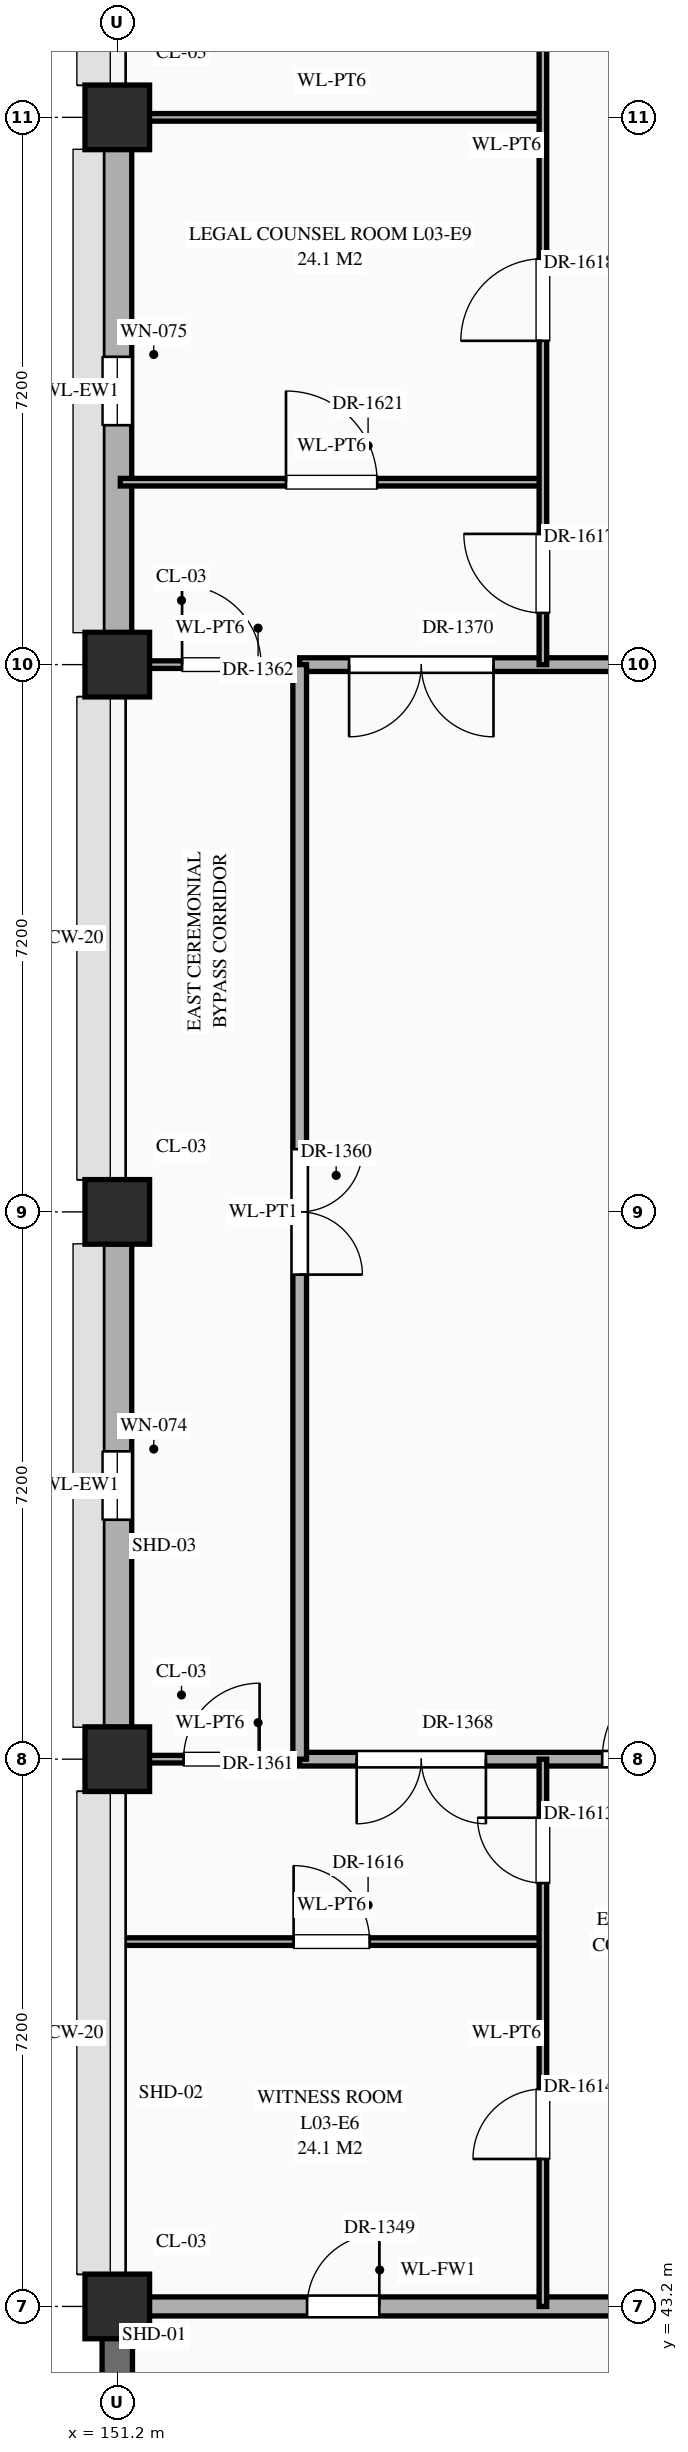
"""IFC4 building model, lengths in metres.
Left out: names, types, materials, properties, quantities, classifications, styles, units other than length and angle.
Written with IfcOpenShell. Run it as: python <this file> out.ifc"""

import sys

from ifc_helpers import new_model, si_unit, direction, frame, frame_2d, origin, origin_2d, place, context, subcontext, project, spatial, rectangle, extrude, element, fill, save


model = new_model("IFC4")
c1 = context("Model", 3, precision=1e-05, world=origin(), true_north=direction((0.0, 1.0)))
c2 = subcontext(c1, "Body", "Model", "MODEL_VIEW")
j1 = project(units=[si_unit("LENGTHUNIT", "METRE"), si_unit("PLANEANGLEUNIT", "RADIAN")], contexts=[c1])
p1 = place(None, origin())
s1 = spatial("IfcSite", under=j1, at=p1, CompositionType="ELEMENT")
p2 = place(p1, origin())
s2 = spatial("IfcBuilding", under=s1, at=p2, CompositionType="ELEMENT")
p3 = place(p2, frame((0.0, 0.0, 10.8)))
s3 = spatial("IfcBuildingStorey", under=s2, at=p3, CompositionType="ELEMENT", Elevation=10.8)
for number, where, z_axis, x_axis in (
    (1, (151.2, 43.2, 0.0), (0.0, 0.0, 1.0), (1.0, 0.0, 0.0)),
    (2, (151.2, 50.4, 0.0), (0.0, 0.0, 1.0), (1.0, 0.0, 0.0)),
    (3, (151.2, 57.6, 0.0), (0.0, 0.0, 1.0), (1.0, 0.0, 0.0)),
    (4, (151.2, 64.8, 0.0), (0.0, 0.0, 1.0), (1.0, 0.0, 0.0)),
    (5, (151.2, 72.0, 0.0), (0.0, 0.0, 1.0), (1.0, 0.0, 0.0)),
):
    element("IfcColumn", number, at=place(p3, frame(where, z_axis=z_axis, x_axis=x_axis)), inside=s3, PredefinedType="COLUMN", context=c2, shape_type="SweptSolid", body=[
        extrude(rectangle(XDim=0.85, YDim=0.85, at=origin_2d()), origin(), (0.0, 0.0, 1.0), 5.4),
    ])
p4 = place(p3, frame((151.2, 36.42, 0.0), z_axis=(0.0, 0.0, 1.0), x_axis=(0.0, 1.0, 0.0)))
e6 = element("IfcWall", 6, at=p4, inside=s3, PredefinedType="SHEAR", context=c2, shape_type="SweptSolid", body=[
    extrude(rectangle(XDim=6.36, YDim=0.4, at=frame_2d((3.18, 0.0))), origin(), (0.0, 0.0, 1.0), 5.12),
])
p5 = place(p3, frame((151.2, 50.82, 0.0), z_axis=(0.0, 0.0, 1.0), x_axis=(0.0, 1.0, 0.0)))
e7 = element("IfcWall", 7, at=p5, inside=s3, PredefinedType="STANDARD", context=c2, shape_type="SweptSolid", body=[
    extrude(rectangle(XDim=6.36, YDim=0.38, at=frame_2d((3.18, 0.0))), origin(), (0.0, 0.0, 1.0), 4.47),
])
p6 = place(p5, frame((2.73, 0.0, 0.85)))
e8 = element("IfcOpeningElement", 8, at=p6, cuts=e7, PredefinedType="OPENING", context=c2, shape_type="SweptSolid", body=[
    extrude(rectangle(XDim=0.9, YDim=1.56, at=frame_2d((0.45, 0.78))), frame((0.0, 0.202, 0.0), z_axis=(0.0, -1.0, 0.0), x_axis=(1.0, 0.0, 0.0)), (0.0, 0.0, 1.0), 0.404),
])
p7 = place(p3, frame((151.2, 65.22, 0.0), z_axis=(0.0, 0.0, 1.0), x_axis=(0.0, 1.0, 0.0)))
e9 = element("IfcWall", 9, at=p7, inside=s3, PredefinedType="STANDARD", context=c2, shape_type="SweptSolid", body=[
    extrude(rectangle(XDim=6.36, YDim=0.38, at=frame_2d((3.18, 0.0))), origin(), (0.0, 0.0, 1.0), 4.47),
])
p8 = place(p7, frame((2.73, 0.0, 0.85)))
e10 = element("IfcOpeningElement", 10, at=p8, cuts=e9, PredefinedType="OPENING", context=c2, shape_type="SweptSolid", body=[
    extrude(rectangle(XDim=0.9, YDim=1.92, at=frame_2d((0.45, 0.96))), frame((0.0, 0.202, 0.0), z_axis=(0.0, -1.0, 0.0), x_axis=(1.0, 0.0, 0.0)), (0.0, 0.0, 1.0), 0.404),
])
p9 = place(p3, frame((151.24, 43.2, 0.0), z_axis=(0.0, 0.0, 1.0), x_axis=(1.0, 0.0, 0.0)))
e11 = element("IfcWall", 11, at=p9, inside=s3, PredefinedType="STANDARD", context=c2, shape_type="SweptSolid", body=[
    extrude(rectangle(XDim=8.36, YDim=0.25, at=frame_2d((4.18, 0.0))), origin(), (0.0, 0.0, 1.0), 4.07),
])
p10 = place(p9, frame((6.46, 0.0, 0.0)))
e12 = element("IfcOpeningElement", 12, at=p10, cuts=e11, PredefinedType="OPENING", context=c2, shape_type="SweptSolid", body=[
    extrude(rectangle(XDim=1.0, YDim=2.2, at=frame_2d((0.5, 1.1))), frame((0.0, 0.137, 0.0), z_axis=(0.0, -1.0, 0.0), x_axis=(1.0, 0.0, 0.0)), (0.0, 0.0, 1.0), 0.274),
])
p11 = place(p9, frame((2.458, 0.0, 0.0)))
e13 = element("IfcOpeningElement", 13, at=p11, cuts=e11, PredefinedType="OPENING", context=c2, shape_type="SweptSolid", body=[
    extrude(rectangle(XDim=0.95, YDim=2.15, at=frame_2d((0.475, 1.075))), frame((0.0, 0.137, 0.0), z_axis=(0.0, -1.0, 0.0), x_axis=(1.0, 0.0, 0.0)), (0.0, 0.0, 1.0), 0.274),
])
p12 = place(p3, frame((151.24, 48.0, 0.0), z_axis=(0.0, 0.0, 1.0), x_axis=(1.0, 0.0, 0.0)))
e14 = element("IfcWall", 14, at=p12, inside=s3, PredefinedType="STANDARD", context=c2, shape_type="SweptSolid", body=[
    extrude(rectangle(XDim=5.56, YDim=0.1, at=frame_2d((2.78, 0.0))), origin(), (0.0, 0.0, 1.0), 5.12),
])
p13 = place(p12, frame((2.28, 0.0, 0.0)))
e15 = element("IfcOpeningElement", 15, at=p13, cuts=e14, PredefinedType="OPENING", context=c2, shape_type="SweptSolid", body=[
    extrude(rectangle(XDim=1.0, YDim=2.25, at=frame_2d((0.5, 1.125))), frame((0.0, 0.062, 0.0), z_axis=(0.0, -1.0, 0.0), x_axis=(1.0, 0.0, 0.0)), (0.0, 0.0, 1.0), 0.124),
])
p14 = place(p3, frame((151.24, 50.4, 0.0), z_axis=(0.0, 0.0, 1.0), x_axis=(1.0, 0.0, 0.0)))
e16 = element("IfcWall", 16, at=p14, inside=s3, PredefinedType="STANDARD", context=c2, shape_type="SweptSolid", body=[
    extrude(rectangle(XDim=2.36, YDim=0.1, at=frame_2d((1.18, 0.0))), origin(), (0.0, 0.0, 1.0), 4.07),
])
p15 = place(p14, frame((0.833, 0.0, 0.0)))
e17 = element("IfcOpeningElement", 17, at=p15, cuts=e16, PredefinedType="OPENING", context=c2, shape_type="SweptSolid", body=[
    extrude(rectangle(XDim=1.0, YDim=2.25, at=frame_2d((0.5, 1.125))), frame((0.0, 0.062, 0.0), z_axis=(0.0, -1.0, 0.0), x_axis=(1.0, 0.0, 0.0)), (0.0, 0.0, 1.0), 0.124),
])
p16 = place(p3, frame((153.6, 50.4, 0.0), z_axis=(0.0, 0.0, 1.0), x_axis=(1.0, 0.0, 0.0)))
e18 = element("IfcWall", 18, at=p16, inside=s3, PredefinedType="STANDARD", context=c2, shape_type="SweptSolid", body=[
    extrude(rectangle(XDim=14.36, YDim=0.18, at=frame_2d((7.18, 0.0))), origin(), (0.0, 0.0, 1.0), 4.07),
])
p17 = place(p16, frame((3.98, 0.0, 0.0)))
e19 = element("IfcOpeningElement", 19, at=p17, cuts=e18, PredefinedType="OPENING", context=c2, shape_type="SweptSolid", body=[
    extrude(rectangle(XDim=1.24, YDim=2.3, at=frame_2d((0.62, 1.15))), frame((0.0, 0.102, 0.0), z_axis=(0.0, -1.0, 0.0), x_axis=(1.0, 0.0, 0.0)), (0.0, 0.0, 1.0), 0.204),
])
p18 = place(p16, frame((0.75, 0.0, 0.0)))
e20 = element("IfcOpeningElement", 20, at=p18, cuts=e18, PredefinedType="OPENING", context=c2, shape_type="SweptSolid", body=[
    extrude(rectangle(XDim=1.7, YDim=2.45, at=frame_2d((0.85, 1.225))), frame((0.0, 0.102, 0.0), z_axis=(0.0, -1.0, 0.0), x_axis=(1.0, 0.0, 0.0)), (0.0, 0.0, 1.0), 0.204),
])
p19 = place(p3, frame((151.24, 64.8, 0.0), z_axis=(0.0, 0.0, 1.0), x_axis=(1.0, 0.0, 0.0)))
e21 = element("IfcWall", 21, at=p19, inside=s3, PredefinedType="STANDARD", context=c2, shape_type="SweptSolid", body=[
    extrude(rectangle(XDim=2.36, YDim=0.1, at=frame_2d((1.18, 0.0))), origin(), (0.0, 0.0, 1.0), 4.07),
])
p20 = place(p19, frame((0.812, 0.0, 0.0)))
e22 = element("IfcOpeningElement", 22, at=p20, cuts=e21, PredefinedType="OPENING", context=c2, shape_type="SweptSolid", body=[
    extrude(rectangle(XDim=1.04, YDim=2.2, at=frame_2d((0.52, 1.1))), frame((0.0, 0.062, 0.0), z_axis=(0.0, -1.0, 0.0), x_axis=(1.0, 0.0, 0.0)), (0.0, 0.0, 1.0), 0.124),
])
p21 = place(p3, frame((153.6, 64.8, 0.0), z_axis=(0.0, 0.0, 1.0), x_axis=(1.0, 0.0, 0.0)))
e23 = element("IfcWall", 23, at=p21, inside=s3, PredefinedType="STANDARD", context=c2, shape_type="SweptSolid", body=[
    extrude(rectangle(XDim=14.36, YDim=0.18, at=frame_2d((7.18, 0.0))), origin(), (0.0, 0.0, 1.0), 4.07),
])
p22 = place(p21, frame((4.13, 0.0, 0.0)))
e24 = element("IfcOpeningElement", 24, at=p22, cuts=e23, PredefinedType="OPENING", context=c2, shape_type="SweptSolid", body=[
    extrude(rectangle(XDim=0.94, YDim=2.3, at=frame_2d((0.47, 1.15))), frame((0.0, 0.102, 0.0), z_axis=(0.0, -1.0, 0.0), x_axis=(1.0, 0.0, 0.0)), (0.0, 0.0, 1.0), 0.204),
])
p23 = place(p21, frame((0.65, 0.0, 0.0)))
e25 = element("IfcOpeningElement", 25, at=p23, cuts=e23, PredefinedType="OPENING", context=c2, shape_type="SweptSolid", body=[
    extrude(rectangle(XDim=1.9, YDim=2.5, at=frame_2d((0.95, 1.25))), frame((0.0, 0.102, 0.0), z_axis=(0.0, -1.0, 0.0), x_axis=(1.0, 0.0, 0.0)), (0.0, 0.0, 1.0), 0.204),
])
p24 = place(p3, frame((151.24, 67.2, 0.0), z_axis=(0.0, 0.0, 1.0), x_axis=(1.0, 0.0, 0.0)))
e26 = element("IfcWall", 26, at=p24, inside=s3, PredefinedType="STANDARD", context=c2, shape_type="SweptSolid", body=[
    extrude(rectangle(XDim=5.56, YDim=0.1, at=frame_2d((2.78, 0.0))), origin(), (0.0, 0.0, 1.0), 5.12),
])
p25 = place(p24, frame((2.18, 0.0, 0.0)))
e27 = element("IfcOpeningElement", 27, at=p25, cuts=e26, PredefinedType="OPENING", context=c2, shape_type="SweptSolid", body=[
    extrude(rectangle(XDim=1.2, YDim=2.35, at=frame_2d((0.6, 1.175))), frame((0.0, 0.062, 0.0), z_axis=(0.0, -1.0, 0.0), x_axis=(1.0, 0.0, 0.0)), (0.0, 0.0, 1.0), 0.124),
])
p26 = place(p3, frame((151.24, 72.0, 0.0), z_axis=(0.0, 0.0, 1.0), x_axis=(1.0, 0.0, 0.0)))
e28 = element("IfcWall", 28, at=p26, inside=s3, PredefinedType="STANDARD", context=c2, shape_type="SweptSolid", body=[
    extrude(rectangle(XDim=5.56, YDim=0.1, at=frame_2d((2.78, 0.0))), origin(), (0.0, 0.0, 1.0), 4.07),
])
p27 = place(p3, frame((153.6, 50.4, 0.0), z_axis=(0.0, 0.0, 1.0), x_axis=(0.0, 1.0, 0.0)))
e29 = element("IfcWall", 29, at=p27, inside=s3, PredefinedType="STANDARD", context=c2, shape_type="SweptSolid", body=[
    extrude(rectangle(XDim=14.4, YDim=0.18, at=frame_2d((7.2, 0.0))), origin(), (0.0, 0.0, 1.0), 5.12),
])
p28 = place(p27, frame((6.375, 0.0, 0.0)))
e30 = element("IfcOpeningElement", 30, at=p28, cuts=e29, PredefinedType="OPENING", context=c2, shape_type="SweptSolid", body=[
    extrude(rectangle(XDim=1.65, YDim=2.4, at=frame_2d((0.825, 1.2))), frame((0.0, 0.102, 0.0), z_axis=(0.0, -1.0, 0.0), x_axis=(1.0, 0.0, 0.0)), (0.0, 0.0, 1.0), 0.204),
])
p29 = place(p3, frame((156.8, 43.2, 0.0), z_axis=(0.0, 0.0, 1.0), x_axis=(0.0, 1.0, 0.0)))
e31 = element("IfcWall", 31, at=p29, inside=s3, PredefinedType="STANDARD", context=c2, shape_type="SweptSolid", body=[
    extrude(rectangle(XDim=7.2, YDim=0.1, at=frame_2d((3.6, 0.0))), origin(), (0.0, 0.0, 1.0), 5.12),
])
p30 = place(p29, frame((5.57, 0.0, 0.0)))
e32 = element("IfcOpeningElement", 32, at=p30, cuts=e31, PredefinedType="OPENING", context=c2, shape_type="SweptSolid", body=[
    extrude(rectangle(XDim=0.86, YDim=2.1, at=frame_2d((0.43, 1.05))), frame((0.0, 0.062, 0.0), z_axis=(0.0, -1.0, 0.0), x_axis=(1.0, 0.0, 0.0)), (0.0, 0.0, 1.0), 0.124),
])
p31 = place(p29, frame((1.94, 0.0, 0.0)))
e33 = element("IfcOpeningElement", 33, at=p31, cuts=e31, PredefinedType="OPENING", context=c2, shape_type="SweptSolid", body=[
    extrude(rectangle(XDim=0.92, YDim=2.15, at=frame_2d((0.46, 1.075))), frame((0.0, 0.062, 0.0), z_axis=(0.0, -1.0, 0.0), x_axis=(1.0, 0.0, 0.0)), (0.0, 0.0, 1.0), 0.124),
])
p32 = place(p3, frame((156.8, 64.8, 0.0), z_axis=(0.0, 0.0, 1.0), x_axis=(0.0, 1.0, 0.0)))
e34 = element("IfcWall", 34, at=p32, inside=s3, PredefinedType="STANDARD", context=c2, shape_type="SweptSolid", body=[
    extrude(rectangle(XDim=19.2, YDim=0.1, at=frame_2d((9.6, 0.0))), origin(), (0.0, 0.0, 1.0), 5.12),
])
p33 = place(p32, frame((16.28, 0.0, 0.0)))
e35 = element("IfcOpeningElement", 35, at=p33, cuts=e34, PredefinedType="OPENING", context=c2, shape_type="SweptSolid", body=[
    extrude(rectangle(XDim=1.04, YDim=2.2, at=frame_2d((0.52, 1.1))), frame((0.0, 0.062, 0.0), z_axis=(0.0, -1.0, 0.0), x_axis=(1.0, 0.0, 0.0)), (0.0, 0.0, 1.0), 0.124),
])
p34 = place(p32, frame((0.68, 0.0, 0.0)))
e36 = element("IfcOpeningElement", 36, at=p34, cuts=e34, PredefinedType="OPENING", context=c2, shape_type="SweptSolid", body=[
    extrude(rectangle(XDim=1.04, YDim=2.2, at=frame_2d((0.52, 1.1))), frame((0.0, 0.062, 0.0), z_axis=(0.0, -1.0, 0.0), x_axis=(1.0, 0.0, 0.0)), (0.0, 0.0, 1.0), 0.124),
])
p35 = place(p32, frame((4.26, 0.0, 0.0)))
e37 = element("IfcOpeningElement", 37, at=p35, cuts=e34, PredefinedType="OPENING", context=c2, shape_type="SweptSolid", body=[
    extrude(rectangle(XDim=1.08, YDim=2.25, at=frame_2d((0.54, 1.125))), frame((0.0, 0.062, 0.0), z_axis=(0.0, -1.0, 0.0), x_axis=(1.0, 0.0, 0.0)), (0.0, 0.0, 1.0), 0.124),
])
p36 = place(p32, frame((10.24, 0.0, 0.0)))
e38 = element("IfcOpeningElement", 38, at=p36, cuts=e34, PredefinedType="OPENING", context=c2, shape_type="SweptSolid", body=[
    extrude(rectangle(XDim=1.12, YDim=2.25, at=frame_2d((0.56, 1.125))), frame((0.0, 0.062, 0.0), z_axis=(0.0, -1.0, 0.0), x_axis=(1.0, 0.0, 0.0)), (0.0, 0.0, 1.0), 0.124),
])
p37 = place(p6, origin())
e39 = element("IfcWindow", 39, at=p37, inside=s3, PartitioningType="SINGLE_PANEL", PredefinedType="WINDOW", context=c2, shape_type="SweptSolid", body=[
    extrude(rectangle(XDim=0.9, YDim=1.56, at=frame_2d((0.45, 0.78))), frame((0.0, 0.03, 0.0), z_axis=(0.0, -1.0, 0.0), x_axis=(1.0, 0.0, 0.0)), (0.0, 0.0, 1.0), 0.06),
])
fill(e8, e39)
p38 = place(p8, origin())
e40 = element("IfcWindow", 40, at=p38, inside=s3, PartitioningType="SINGLE_PANEL", PredefinedType="WINDOW", context=c2, shape_type="SweptSolid", body=[
    extrude(rectangle(XDim=0.9, YDim=1.92, at=frame_2d((0.45, 0.96))), frame((0.0, 0.03, 0.0), z_axis=(0.0, -1.0, 0.0), x_axis=(1.0, 0.0, 0.0)), (0.0, 0.0, 1.0), 0.06),
])
fill(e10, e40)
p39 = place(p11, origin())
e41 = element("IfcDoor", 41, at=p39, inside=s3, OperationType="SINGLE_SWING_RIGHT", PredefinedType="DOOR", context=c2, shape_type="SweptSolid", body=[
    extrude(rectangle(XDim=0.95, YDim=2.15, at=frame_2d((0.475, 1.075))), frame((0.0, 0.025, 0.0), z_axis=(0.0, -1.0, 0.0), x_axis=(1.0, 0.0, 0.0)), (0.0, 0.0, 1.0), 0.05),
])
fill(e13, e41)
p40 = place(p28, frame((1.65, 0.0, 0.0), z_axis=(0.0, 0.0, 1.0), x_axis=(-1.0, 0.0, 0.0)))
e42 = element("IfcDoor", 42, at=p40, inside=s3, OperationType="DOUBLE_DOOR_SINGLE_SWING", PredefinedType="DOOR", context=c2, shape_type="SweptSolid", body=[
    extrude(rectangle(XDim=1.65, YDim=2.4, at=frame_2d((0.825, 1.2))), frame((0.0, 0.025, 0.0), z_axis=(0.0, -1.0, 0.0), x_axis=(1.0, 0.0, 0.0)), (0.0, 0.0, 1.0), 0.05),
])
fill(e30, e42)
p41 = place(p15, origin())
e43 = element("IfcDoor", 43, at=p41, inside=s3, OperationType="SINGLE_SWING_RIGHT", PredefinedType="DOOR", context=c2, shape_type="SweptSolid", body=[
    extrude(rectangle(XDim=1.0, YDim=2.25, at=frame_2d((0.5, 1.125))), frame((0.0, 0.025, 0.0), z_axis=(0.0, -1.0, 0.0), x_axis=(1.0, 0.0, 0.0)), (0.0, 0.0, 1.0), 0.05),
])
fill(e17, e43)
p42 = place(p20, origin())
e44 = element("IfcDoor", 44, at=p42, inside=s3, OperationType="SINGLE_SWING_LEFT", PredefinedType="DOOR", context=c2, shape_type="SweptSolid", body=[
    extrude(rectangle(XDim=1.04, YDim=2.2, at=frame_2d((0.52, 1.1))), frame((0.0, 0.025, 0.0), z_axis=(0.0, -1.0, 0.0), x_axis=(1.0, 0.0, 0.0)), (0.0, 0.0, 1.0), 0.05),
])
fill(e22, e44)
p43 = place(p17, origin())
e45 = element("IfcDoor", 45, at=p43, inside=s3, OperationType="SINGLE_SWING_RIGHT", PredefinedType="DOOR", context=c2, shape_type="SweptSolid", body=[
    extrude(rectangle(XDim=1.24, YDim=2.3, at=frame_2d((0.62, 1.15))), frame((0.0, 0.025, 0.0), z_axis=(0.0, -1.0, 0.0), x_axis=(1.0, 0.0, 0.0)), (0.0, 0.0, 1.0), 0.05),
])
fill(e19, e45)
p44 = place(p18, frame((1.7, 0.0, 0.0), z_axis=(0.0, 0.0, 1.0), x_axis=(-1.0, 0.0, 0.0)))
e46 = element("IfcDoor", 46, at=p44, inside=s3, OperationType="DOUBLE_DOOR_SINGLE_SWING", PredefinedType="DOOR", context=c2, shape_type="SweptSolid", body=[
    extrude(rectangle(XDim=1.7, YDim=2.45, at=frame_2d((0.85, 1.225))), frame((0.0, 0.025, 0.0), z_axis=(0.0, -1.0, 0.0), x_axis=(1.0, 0.0, 0.0)), (0.0, 0.0, 1.0), 0.05),
])
fill(e20, e46)
p45 = place(p23, frame((1.9, 0.0, 0.0), z_axis=(0.0, 0.0, 1.0), x_axis=(-1.0, 0.0, 0.0)))
e47 = element("IfcDoor", 47, at=p45, inside=s3, OperationType="DOUBLE_DOOR_SINGLE_SWING", PredefinedType="DOOR", context=c2, shape_type="SweptSolid", body=[
    extrude(rectangle(XDim=1.9, YDim=2.5, at=frame_2d((0.95, 1.25))), frame((0.0, 0.025, 0.0), z_axis=(0.0, -1.0, 0.0), x_axis=(1.0, 0.0, 0.0)), (0.0, 0.0, 1.0), 0.05),
])
fill(e25, e47)
p46 = place(p30, origin())
e48 = element("IfcDoor", 48, at=p46, inside=s3, OperationType="SINGLE_SWING_RIGHT", PredefinedType="DOOR", context=c2, shape_type="SweptSolid", body=[
    extrude(rectangle(XDim=0.86, YDim=2.1, at=frame_2d((0.43, 1.05))), frame((0.0, 0.025, 0.0), z_axis=(0.0, -1.0, 0.0), x_axis=(1.0, 0.0, 0.0)), (0.0, 0.0, 1.0), 0.05),
])
fill(e32, e48)
p47 = place(p31, origin())
e49 = element("IfcDoor", 49, at=p47, inside=s3, OperationType="SINGLE_SWING_LEFT", PredefinedType="DOOR", context=c2, shape_type="SweptSolid", body=[
    extrude(rectangle(XDim=0.92, YDim=2.15, at=frame_2d((0.46, 1.075))), frame((0.0, 0.025, 0.0), z_axis=(0.0, -1.0, 0.0), x_axis=(1.0, 0.0, 0.0)), (0.0, 0.0, 1.0), 0.05),
])
fill(e33, e49)
p48 = place(p13, origin())
e50 = element("IfcDoor", 50, at=p48, inside=s3, OperationType="SINGLE_SWING_LEFT", PredefinedType="DOOR", context=c2, shape_type="SweptSolid", body=[
    extrude(rectangle(XDim=1.0, YDim=2.25, at=frame_2d((0.5, 1.125))), frame((0.0, 0.025, 0.0), z_axis=(0.0, -1.0, 0.0), x_axis=(1.0, 0.0, 0.0)), (0.0, 0.0, 1.0), 0.05),
])
fill(e15, e50)
p49 = place(p34, origin())
e51 = element("IfcDoor", 51, at=p49, inside=s3, OperationType="SINGLE_SWING_RIGHT", PredefinedType="DOOR", context=c2, shape_type="SweptSolid", body=[
    extrude(rectangle(XDim=1.04, YDim=2.2, at=frame_2d((0.52, 1.1))), frame((0.0, 0.025, 0.0), z_axis=(0.0, -1.0, 0.0), x_axis=(1.0, 0.0, 0.0)), (0.0, 0.0, 1.0), 0.05),
])
fill(e36, e51)
p50 = place(p35, origin())
e52 = element("IfcDoor", 52, at=p50, inside=s3, OperationType="SINGLE_SWING_LEFT", PredefinedType="DOOR", context=c2, shape_type="SweptSolid", body=[
    extrude(rectangle(XDim=1.08, YDim=2.25, at=frame_2d((0.54, 1.125))), frame((0.0, 0.025, 0.0), z_axis=(0.0, -1.0, 0.0), x_axis=(1.0, 0.0, 0.0)), (0.0, 0.0, 1.0), 0.05),
])
fill(e37, e52)
p51 = place(p25, origin())
e53 = element("IfcDoor", 53, at=p51, inside=s3, OperationType="SINGLE_SWING_LEFT", PredefinedType="DOOR", context=c2, shape_type="SweptSolid", body=[
    extrude(rectangle(XDim=1.2, YDim=2.35, at=frame_2d((0.6, 1.175))), frame((0.0, 0.025, 0.0), z_axis=(0.0, -1.0, 0.0), x_axis=(1.0, 0.0, 0.0)), (0.0, 0.0, 1.0), 0.05),
])
fill(e27, e53)
save(model, sys.argv[1])
